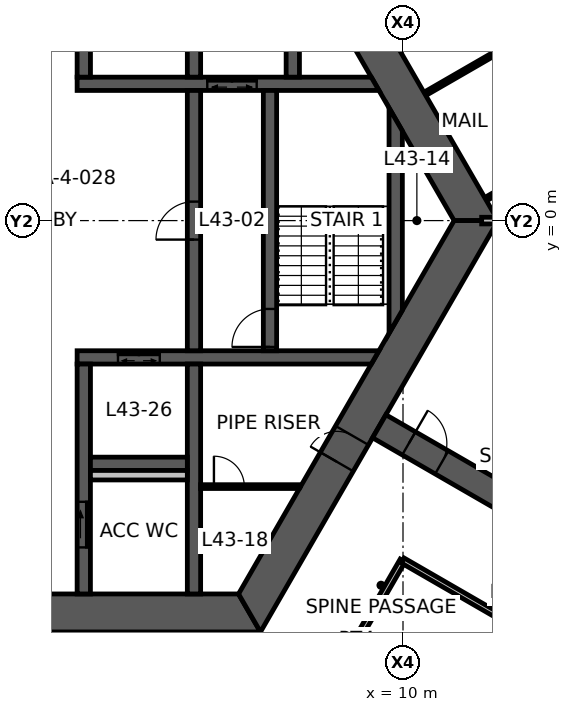
"""IFC4 building model, lengths in metres.
Left out: names, types, materials, properties, quantities, classifications, styles, units other than length and angle.
Written with IfcOpenShell. Run it as: python <this file> out.ifc"""

import sys

from ifc_helpers import new_model, si_unit, direction, frame, frame_2d, origin, place, context, subcontext, project, spatial, polyline, rectangle, outline, extrude, element, fill, save


model = new_model("IFC4")
c1 = context("Model", 3, precision=1e-05, world=origin(), true_north=direction((0.0, 1.0)))
c2 = subcontext(c1, "Body", "Model", "MODEL_VIEW")
j1 = project(units=[si_unit("LENGTHUNIT", "METRE"), si_unit("PLANEANGLEUNIT", "RADIAN")], contexts=[c1])
p1 = place(None, origin())
s1 = spatial("IfcSite", under=j1, at=p1, CompositionType="ELEMENT")
p2 = place(p1, origin())
s2 = spatial("IfcBuilding", under=s1, at=p2, CompositionType="ELEMENT")
p3 = place(p2, frame((0.0, 0.0, 172.1)))
s3 = spatial("IfcBuildingStorey", under=s2, at=p3, CompositionType="ELEMENT", Elevation=172.1)
p4 = place(p3, frame((11.922, 0.0, 0.0), z_axis=(0.0, 0.0, 1.0), x_axis=(-0.500004296715, 0.866022923061, 0.0)))
e1 = element("IfcWall", 1, at=p4, inside=s3, PredefinedType="SHEAR", context=c2, shape_type="SweptSolid", body=[
    extrude(outline(polyline([(-0.289, -0.5), (5.835, -0.5), (6.635, -0.5), (12.211, -0.5), (11.634, 0.5), (6.635, 0.5), (5.835, 0.5), (0.289, 0.5), (-0.289, -0.5)])), origin(), (0.0, 0.0, 1.0), 3.9),
])
p5 = place(p4, frame((5.835, 0.0, 0.0)))
e2 = element("IfcOpeningElement", 2, at=p5, cuts=e1, PredefinedType="OPENING", context=c2, shape_type="SweptSolid", body=[
    extrude(rectangle(XDim=0.8, YDim=2.1, at=frame_2d((0.4, 1.05))), frame((0.0, 0.51, 0.0), z_axis=(0.0, -1.0, 0.0), x_axis=(1.0, 0.0, 0.0)), (0.0, 0.0, 1.0), 1.02),
])
p6 = place(p3, frame((-5.961, -10.325, 0.0), z_axis=(0.0, 0.0, 1.0), x_axis=(1.0, 0.0, 0.0)))
e3 = element("IfcWall", 3, at=p6, inside=s3, PredefinedType="SHEAR", context=c2, shape_type="SweptSolid", body=[
    extrude(outline(polyline([(-0.289, -0.5), (5.461, -0.5), (6.461, -0.5), (12.211, -0.5), (11.634, 0.5), (6.461, 0.5), (5.461, 0.5), (0.289, 0.5), (-0.289, -0.5)])), origin(), (0.0, 0.0, 1.0), 3.9),
])
p7 = place(p6, frame((5.461, 0.0, 0.0)))
e4 = element("IfcOpeningElement", 4, at=p7, cuts=e3, PredefinedType="OPENING", context=c2, shape_type="SweptSolid", body=[
    extrude(rectangle(XDim=1.0, YDim=2.1, at=frame_2d((0.5, 1.05))), frame((0.0, 0.51, 0.0), z_axis=(0.0, -1.0, 0.0), x_axis=(1.0, 0.0, 0.0)), (0.0, 0.0, 1.0), 1.02),
])
p8 = place(p3, frame((5.961, -10.325, 0.0), z_axis=(0.0, 0.0, 1.0), x_axis=(0.500004296715, 0.866022923061, 0.0)))
e5 = element("IfcWall", 5, at=p8, inside=s3, PredefinedType="SHEAR", context=c2, shape_type="SweptSolid", body=[
    extrude(outline(polyline([(-0.289, -0.5), (4.594, -0.5), (5.394, -0.5), (12.211, -0.5), (11.634, 0.5), (5.394, 0.5), (4.594, 0.5), (0.289, 0.5), (-0.289, -0.5)])), origin(), (0.0, 0.0, 1.0), 3.9),
])
p9 = place(p8, frame((4.594, 0.0, 0.0)))
e6 = element("IfcOpeningElement", 6, at=p9, cuts=e5, PredefinedType="OPENING", context=c2, shape_type="SweptSolid", body=[
    extrude(rectangle(XDim=0.8, YDim=2.1, at=frame_2d((0.4, 1.05))), frame((0.0, 0.51, 0.0), z_axis=(0.0, -1.0, 0.0), x_axis=(1.0, 0.0, 0.0)), (0.0, 0.0, 1.0), 1.02),
])
p10 = place(p3, frame((9.375, -5.413, 0.0), z_axis=(0.0, 0.0, 1.0), x_axis=(0.866032377459, -0.499987921047, 0.0)))
e7 = element("IfcWall", 7, at=p10, inside=s3, PredefinedType="SHEAR", context=c2, shape_type="SweptSolid", body=[
    extrude(rectangle(XDim=7.696, YDim=0.7, at=frame_2d((3.848, 0.0))), origin(), (0.0, 0.0, 1.0), 3.9),
])
p11 = place(p10, frame((0.9, 0.0, 0.0)))
e8 = element("IfcOpeningElement", 8, at=p11, cuts=e7, PredefinedType="OPENING", context=c2, shape_type="SweptSolid", body=[
    extrude(rectangle(XDim=1.0, YDim=2.1, at=frame_2d((0.5, 1.05))), frame((0.0, 0.36, 0.0), z_axis=(0.0, -1.0, 0.0), x_axis=(1.0, 0.0, 0.0)), (0.0, 0.0, 1.0), 0.72),
])
p12 = place(p3, frame((1.425, 3.6, 0.0), z_axis=(0.0, 0.0, 1.0), x_axis=(1.0, 0.0, 0.0)))
e9 = element("IfcWall", 9, at=p12, inside=s3, PredefinedType="SHEAR", context=c2, shape_type="SweptSolid", body=[
    extrude(outline(polyline([(0.0, -0.175), (3.425, -0.175), (4.725, -0.175), (7.942, -0.175), (7.74, 0.175), (4.725, 0.175), (3.425, 0.175), (0.0, 0.175), (0.0, -0.175)])), origin(), (0.0, 0.0, 1.0), 3.9),
])
p13 = place(p12, frame((3.425, 0.0, 0.0)))
e10 = element("IfcOpeningElement", 10, at=p13, cuts=e9, PredefinedType="OPENING", context=c2, shape_type="SweptSolid", body=[
    extrude(rectangle(XDim=1.3, YDim=2.1, at=frame_2d((0.65, 1.05))), frame((0.0, 0.185, 0.0), z_axis=(0.0, -1.0, 0.0), x_axis=(1.0, 0.0, 0.0)), (0.0, 0.0, 1.0), 0.37),
])
p14 = place(p3, frame((1.425, -3.6, 0.0), z_axis=(0.0, 0.0, 1.0), x_axis=(1.0, 0.0, 0.0)))
e11 = element("IfcWall", 11, at=p14, inside=s3, PredefinedType="SHEAR", context=c2, shape_type="SweptSolid", body=[
    extrude(outline(polyline([(0.0, -0.175), (1.075, -0.175), (2.175, -0.175), (7.74, -0.175), (7.942, 0.175), (2.175, 0.175), (1.075, 0.175), (0.0, 0.175), (0.0, -0.175)])), origin(), (0.0, 0.0, 1.0), 3.9),
])
p15 = place(p14, frame((1.075, 0.0, 0.0)))
e12 = element("IfcOpeningElement", 12, at=p15, cuts=e11, PredefinedType="OPENING", context=c2, shape_type="SweptSolid", body=[
    extrude(rectangle(XDim=1.1, YDim=2.1, at=frame_2d((0.55, 1.05))), frame((0.0, 0.185, 0.0), z_axis=(0.0, -1.0, 0.0), x_axis=(1.0, 0.0, 0.0)), (0.0, 0.0, 1.0), 0.37),
])
p16 = place(p3, frame((1.6, 3.775, 0.0), z_axis=(0.0, 0.0, 1.0), x_axis=(0.0, 1.0, 0.0)))
e13 = element("IfcWall", 13, at=p16, inside=s3, PredefinedType="SHEAR", context=c2, shape_type="SweptSolid", body=[
    extrude(rectangle(XDim=6.05, YDim=0.35, at=frame_2d((3.025, 0.0))), origin(), (0.0, 0.0, 1.0), 3.9),
])
p17 = place(p16, frame((3.775, 0.0, 0.0)))
e14 = element("IfcOpeningElement", 14, at=p17, cuts=e13, PredefinedType="OPENING", context=c2, shape_type="SweptSolid", body=[
    extrude(rectangle(XDim=0.9, YDim=2.1, at=frame_2d((0.45, 1.05))), frame((0.0, 0.185, 0.0), z_axis=(0.0, -1.0, 0.0), x_axis=(1.0, 0.0, 0.0)), (0.0, 0.0, 1.0), 0.37),
])
p18 = place(p3, frame((1.6, -3.775, 0.0), z_axis=(0.0, 0.0, 1.0), x_axis=(0.0, -1.0, 0.0)))
e15 = element("IfcWall", 15, at=p18, inside=s3, PredefinedType="SHEAR", context=c2, shape_type="SweptSolid", body=[
    extrude(rectangle(XDim=6.05, YDim=0.35, at=frame_2d((3.025, 0.0))), origin(), (0.0, 0.0, 1.0), 3.9),
])
p19 = place(p18, frame((3.625, 0.0, 0.0)))
e16 = element("IfcOpeningElement", 16, at=p19, cuts=e15, PredefinedType="OPENING", context=c2, shape_type="SweptSolid", body=[
    extrude(rectangle(XDim=1.2, YDim=2.1, at=frame_2d((0.6, 1.05))), frame((0.0, 0.185, 0.0), z_axis=(0.0, -1.0, 0.0), x_axis=(1.0, 0.0, 0.0)), (0.0, 0.0, 1.0), 0.37),
])
p20 = place(p3, frame((4.5, -3.425, 0.0), z_axis=(0.0, 0.0, 1.0), x_axis=(0.0, 1.0, 0.0)))
e17 = element("IfcWall", 17, at=p20, inside=s3, PredefinedType="SHEAR", context=c2, shape_type="SweptSolid", body=[
    extrude(rectangle(XDim=6.85, YDim=0.35, at=frame_2d((3.425, 0.0))), origin(), (0.0, 0.0, 1.0), 3.9),
])
p21 = place(p20, frame((2.925, 0.0, 0.0)))
e18 = element("IfcOpeningElement", 18, at=p21, cuts=e17, PredefinedType="OPENING", context=c2, shape_type="SweptSolid", body=[
    extrude(rectangle(XDim=1.0, YDim=2.1, at=frame_2d((0.5, 1.05))), frame((0.0, 0.185, 0.0), z_axis=(0.0, -1.0, 0.0), x_axis=(1.0, 0.0, 0.0)), (0.0, 0.0, 1.0), 0.37),
])
p22 = place(p3, frame((6.5, -3.425, 0.0), z_axis=(0.0, 0.0, 1.0), x_axis=(0.0, 1.0, 0.0)))
e19 = element("IfcWall", 19, at=p22, inside=s3, PredefinedType="SHEAR", context=c2, shape_type="SweptSolid", body=[
    extrude(rectangle(XDim=6.85, YDim=0.35, at=frame_2d((3.425, 0.0))), origin(), (0.0, 0.0, 1.0), 3.9),
])
p23 = place(p22, frame((0.1, 0.0, 0.0)))
e20 = element("IfcOpeningElement", 20, at=p23, cuts=e19, PredefinedType="OPENING", context=c2, shape_type="SweptSolid", body=[
    extrude(rectangle(XDim=1.0, YDim=2.1, at=frame_2d((0.5, 1.05))), frame((0.0, 0.185, 0.0), z_axis=(0.0, -1.0, 0.0), x_axis=(1.0, 0.0, 0.0)), (0.0, 0.0, 1.0), 0.37),
])
p24 = place(p3, frame((4.5, 3.775, 0.0), z_axis=(0.0, 0.0, 1.0), x_axis=(0.0, 1.0, 0.0)))
e21 = element("IfcWall", 21, at=p24, inside=s3, PredefinedType="SHEAR", context=c2, shape_type="SweptSolid", body=[
    extrude(rectangle(XDim=3.4, YDim=0.35, at=frame_2d((1.7, 0.0))), origin(), (0.0, 0.0, 1.0), 3.9),
])
p25 = place(p3, frame((4.5, -3.775, 0.0), z_axis=(0.0, 0.0, 1.0), x_axis=(0.0, -1.0, 0.0)))
e22 = element("IfcWall", 22, at=p25, inside=s3, PredefinedType="SHEAR", context=c2, shape_type="SweptSolid", body=[
    extrude(rectangle(XDim=6.05, YDim=0.35, at=frame_2d((3.025, 0.0))), origin(), (0.0, 0.0, 1.0), 3.9),
])
p26 = place(p3, frame((1.775, -6.4, 0.0), z_axis=(0.0, 0.0, 1.0), x_axis=(1.0, 0.0, 0.0)))
e23 = element("IfcWall", 23, at=p26, inside=s3, PredefinedType="SHEAR", context=c2, shape_type="SweptSolid", body=[
    extrude(rectangle(XDim=2.55, YDim=0.35, at=frame_2d((1.275, 0.0))), origin(), (0.0, 0.0, 1.0), 3.9),
])
p27 = place(p3, frame((7.1, 3.775, 0.0), z_axis=(0.0, 0.0, 1.0), x_axis=(0.0, 1.0, 0.0)))
e24 = element("IfcWall", 24, at=p27, inside=s3, PredefinedType="SHEAR", context=c2, shape_type="SweptSolid", body=[
    extrude(outline(polyline([(0.0, -0.175), (3.274, -0.175), (3.4, 0.0), (3.4, 0.175), (0.0, 0.175), (0.0, -0.175)])), origin(), (0.0, 0.0, 1.0), 3.9),
])
p28 = place(p3, frame((9.808, -2.662, 0.0), z_axis=(0.0, 0.0, 1.0), x_axis=(0.0, 1.0, 0.0)))
e25 = element("IfcWall", 25, at=p28, inside=s3, PredefinedType="SHEAR", context=c2, shape_type="SweptSolid", body=[
    extrude(outline(polyline([(0.303, -0.175), (5.021, -0.175), (5.628, 0.175), (-0.303, 0.175), (0.303, -0.175)])), origin(), (0.0, 0.0, 1.0), 3.9),
])
p29 = place(p3, frame((1.775, -6.7, 0.0), z_axis=(0.0, 0.0, 1.0), x_axis=(1.0, 0.0, 0.0)))
e26 = element("IfcWall", 26, at=p29, inside=s3, PredefinedType="PLUMBINGWALL", context=c2, shape_type="SweptSolid", body=[
    extrude(rectangle(XDim=2.55, YDim=0.25, at=frame_2d((1.275, 0.0))), origin(), (0.0, 0.0, 1.0), 3.9),
])
p30 = place(p3, frame((4.675, -7.0, 0.0), z_axis=(0.0, 0.0, 1.0), x_axis=(1.0, 0.0, 0.0)))
e27 = element("IfcWall", 27, at=p30, inside=s3, PredefinedType="PARTITIONING", context=c2, shape_type="SweptSolid", body=[
    extrude(outline(polyline([(0.0, -0.05), (0.35, -0.05), (1.15, -0.05), (2.6, -0.05), (2.628, 0.0), (2.634, 0.05), (1.15, 0.05), (0.35, 0.05), (0.0, 0.05), (0.0, -0.05)])), origin(), (0.0, 0.0, 1.0), 2.95),
])
p31 = place(p30, frame((0.35, 0.0, 0.0)))
e28 = element("IfcOpeningElement", 28, at=p31, cuts=e27, PredefinedType="OPENING", context=c2, shape_type="SweptSolid", body=[
    extrude(rectangle(XDim=0.8, YDim=2.1, at=frame_2d((0.4, 1.05))), frame((0.0, 0.06, 0.0), z_axis=(0.0, -1.0, 0.0), x_axis=(1.0, 0.0, 0.0)), (0.0, 0.0, 1.0), 0.12),
])
p32 = place(p3, frame((12.07, 0.0, 0.0), z_axis=(0.0, 0.0, 1.0), x_axis=(1.0, 0.0, 0.0)))
e29 = element("IfcWall", 29, at=p32, inside=s3, PredefinedType="PARTITIONING", context=c2, shape_type="SweptSolid", body=[
    extrude(rectangle(XDim=7.93, YDim=0.175, at=frame_2d((3.965, 0.0))), origin(), (0.0, 0.0, 1.0), 3.05),
])
p33 = place(p32, frame((1.13, 0.0, 0.0)))
e30 = element("IfcOpeningElement", 30, at=p33, cuts=e29, PredefinedType="OPENING", context=c2, shape_type="SweptSolid", body=[
    extrude(rectangle(XDim=1.0, YDim=2.1, at=frame_2d((0.5, 1.05))), frame((0.0, 0.098, 0.0), z_axis=(0.0, -1.0, 0.0), x_axis=(1.0, 0.0, 0.0)), (0.0, 0.0, 1.0), 0.195),
])
p34 = place(p3, frame((10.592, 3.344, 0.0), z_axis=(0.0, 0.0, 1.0), x_axis=(0.866021702275, 0.500006411147, 0.0)))
e31 = element("IfcWall", 31, at=p34, inside=s3, PredefinedType="PARTITIONING", context=c2, shape_type="SweptSolid", body=[
    extrude(rectangle(XDim=2.58, YDim=0.1, at=frame_2d((1.29, 0.0))), origin(), (0.0, 0.0, 1.0), 2.95),
])
p35 = place(p3, frame((14.427, 1.863, 0.0), z_axis=(0.0, 0.0, 1.0), x_axis=(-0.866045356598, -0.49996543912, 0.0)))
e32 = element("IfcWall", 32, at=p35, inside=s3, PredefinedType="PARTITIONING", context=c2, shape_type="SweptSolid", body=[
    extrude(rectangle(XDim=2.58, YDim=0.1, at=frame_2d((1.29, 0.0))), origin(), (0.0, 0.0, 1.0), 2.95),
])
p36 = place(p3, frame((9.992, -8.944, 0.0), z_axis=(0.0, 0.0, 1.0), x_axis=(-0.500033248206, -0.866006207073, 0.0)))
e33 = element("IfcWall", 33, at=p36, inside=s3, PredefinedType="PARTITIONING", context=c2, shape_type="SweptSolid", body=[
    extrude(rectangle(XDim=4.828, YDim=0.15, at=frame_2d((2.414, 0.0))), origin(), (0.0, 0.0, 1.0), 2.95),
])
p37 = place(p3, frame((16.721, -12.83, 0.0), z_axis=(0.0, 0.0, 1.0), x_axis=(-0.866020780657, 0.500008007406, 0.0)))
e34 = element("IfcWall", 34, at=p37, inside=s3, PredefinedType="PARTITIONING", context=c2, shape_type="SweptSolid", body=[
    extrude(rectangle(XDim=7.771, YDim=0.15, at=frame_2d((3.885, 0.0))), origin(), (0.0, 0.0, 1.0), 2.95),
])
p38 = place(p37, frame((3.385, 0.0, 0.0)))
e35 = element("IfcOpeningElement", 35, at=p38, cuts=e34, PredefinedType="OPENING", context=c2, shape_type="SweptSolid", body=[
    extrude(rectangle(XDim=1.0, YDim=2.1, at=frame_2d((0.5, 1.05))), frame((0.0, 0.085, 0.0), z_axis=(0.0, -1.0, 0.0), x_axis=(1.0, 0.0, 0.0)), (0.0, 0.0, 1.0), 0.17),
])
p39 = place(p9, origin())
e36 = element("IfcDoor", 36, at=p39, inside=s3, OperationType="SINGLE_SWING_LEFT", PredefinedType="DOOR", context=c2, shape_type="SweptSolid", body=[
    extrude(rectangle(XDim=0.8, YDim=2.1, at=frame_2d((0.4, 1.05))), frame((0.0, 0.025, 0.0), z_axis=(0.0, -1.0, 0.0), x_axis=(1.0, 0.0, 0.0)), (0.0, 0.0, 1.0), 0.05),
])
fill(e6, e36)
p40 = place(p21, origin())
e37 = element("IfcDoor", 37, at=p40, inside=s3, OperationType="SINGLE_SWING_LEFT", PredefinedType="DOOR", context=c2, shape_type="SweptSolid", body=[
    extrude(rectangle(XDim=1.0, YDim=2.1, at=frame_2d((0.5, 1.05))), frame((0.0, 0.025, 0.0), z_axis=(0.0, -1.0, 0.0), x_axis=(1.0, 0.0, 0.0)), (0.0, 0.0, 1.0), 0.05),
])
fill(e18, e37)
p41 = place(p23, origin())
e38 = element("IfcDoor", 38, at=p41, inside=s3, OperationType="SINGLE_SWING_LEFT", PredefinedType="DOOR", context=c2, shape_type="SweptSolid", body=[
    extrude(rectangle(XDim=1.0, YDim=2.1, at=frame_2d((0.5, 1.05))), frame((0.0, 0.025, 0.0), z_axis=(0.0, -1.0, 0.0), x_axis=(1.0, 0.0, 0.0)), (0.0, 0.0, 1.0), 0.05),
])
fill(e20, e38)
p42 = place(p19, origin())
e39 = element("IfcDoor", 39, at=p42, inside=s3, OperationType="SLIDING_TO_LEFT", PredefinedType="DOOR", context=c2, shape_type="SweptSolid", body=[
    extrude(rectangle(XDim=1.2, YDim=2.1, at=frame_2d((0.6, 1.05))), frame((0.0, 0.025, 0.0), z_axis=(0.0, -1.0, 0.0), x_axis=(1.0, 0.0, 0.0)), (0.0, 0.0, 1.0), 0.05),
])
fill(e16, e39)
p43 = place(p11, origin())
e40 = element("IfcDoor", 40, at=p43, inside=s3, OperationType="SINGLE_SWING_LEFT", PredefinedType="DOOR", context=c2, shape_type="SweptSolid", body=[
    extrude(rectangle(XDim=1.0, YDim=2.1, at=frame_2d((0.5, 1.05))), frame((0.0, 0.025, 0.0), z_axis=(0.0, -1.0, 0.0), x_axis=(1.0, 0.0, 0.0)), (0.0, 0.0, 1.0), 0.05),
])
fill(e8, e40)
p44 = place(p31, origin())
e41 = element("IfcDoor", 41, at=p44, inside=s3, OperationType="SINGLE_SWING_LEFT", PredefinedType="DOOR", context=c2, shape_type="SweptSolid", body=[
    extrude(rectangle(XDim=0.8, YDim=2.1, at=frame_2d((0.4, 1.05))), frame((0.0, 0.025, 0.0), z_axis=(0.0, -1.0, 0.0), x_axis=(1.0, 0.0, 0.0)), (0.0, 0.0, 1.0), 0.05),
])
fill(e28, e41)
p45 = place(p15, origin())
e42 = element("IfcDoor", 42, at=p45, inside=s3, OperationType="DOUBLE_DOOR_SLIDING", PredefinedType="DOOR", context=c2, shape_type="SweptSolid", body=[
    extrude(rectangle(XDim=1.1, YDim=2.1, at=frame_2d((0.55, 1.05))), frame((0.0, 0.025, 0.0), z_axis=(0.0, -1.0, 0.0), x_axis=(1.0, 0.0, 0.0)), (0.0, 0.0, 1.0), 0.05),
])
fill(e12, e42)
p46 = place(p13, origin())
e43 = element("IfcDoor", 43, at=p46, inside=s3, OperationType="DOUBLE_DOOR_SLIDING", PredefinedType="DOOR", context=c2, shape_type="SweptSolid", body=[
    extrude(rectangle(XDim=1.3, YDim=2.1, at=frame_2d((0.65, 1.05))), frame((0.0, 0.025, 0.0), z_axis=(0.0, -1.0, 0.0), x_axis=(1.0, 0.0, 0.0)), (0.0, 0.0, 1.0), 0.05),
])
fill(e10, e43)
save(model, sys.argv[1])
